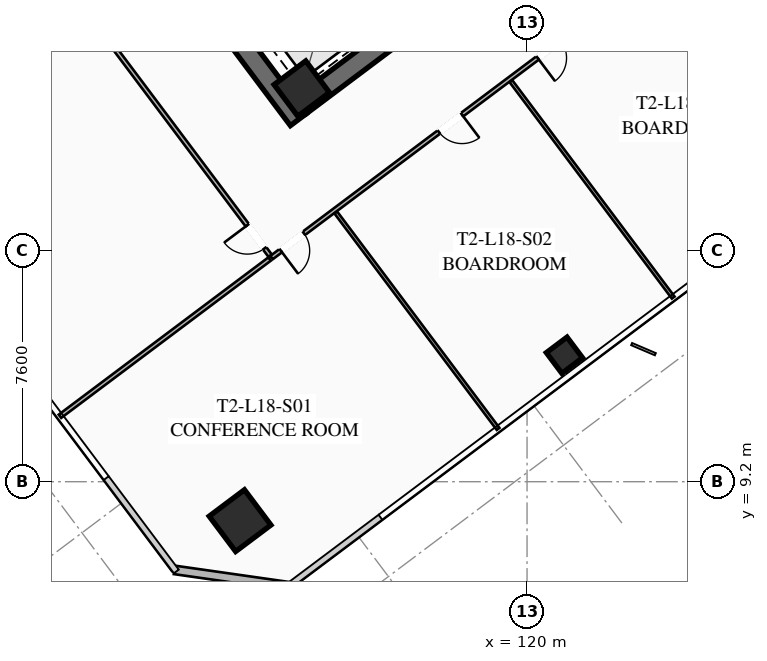
"""IFC4 building model, lengths in metres.
Left out: names, types, materials, properties, quantities, classifications, styles, units other than length and angle.
Written with IfcOpenShell. Run it as: python <this file> out.ifc"""

import sys

from ifc_helpers import new_model, si_unit, direction, frame, frame_2d, origin, origin_2d, place, context, subcontext, project, spatial, rectangle, hollow_rectangle, extrude, element, fill, save


model = new_model("IFC4")
c1 = context("Model", 3, precision=1e-05, world=origin(), true_north=direction((0.0, 1.0)))
c2 = subcontext(c1, "Body", "Model", "MODEL_VIEW")
j1 = project(units=[si_unit("LENGTHUNIT", "METRE"), si_unit("PLANEANGLEUNIT", "RADIAN")], contexts=[c1])
p1 = place(None, origin())
s1 = spatial("IfcSite", under=j1, at=p1, CompositionType="ELEMENT")
p2 = place(p1, origin())
s2 = spatial("IfcBuilding", under=s1, at=p2, CompositionType="ELEMENT")
p3 = place(p2, frame((0.0, 0.0, 70.75)))
s3 = spatial("IfcBuildingStorey", under=s2, at=p3, CompositionType="ELEMENT", Elevation=70.75)
p4 = place(p3, frame((112.476, 21.107, 0.0), z_axis=(0.0, 0.0, 1.0), x_axis=(-0.600005007985, 0.799996243986, 0.0)))
e1 = element("IfcWall", 1, at=p4, inside=s3, PredefinedType="SHEAR", context=c2, shape_type="SweptSolid", body=[
    extrude(rectangle(XDim=15.6, YDim=0.65, at=frame_2d((7.8, 0.0))), origin(), (0.0, 0.0, 1.0), 3.55),
])
p5 = place(p3, frame((124.429, 30.478, 0.0), z_axis=(0.0, 0.0, 1.0), x_axis=(-0.799998028465, -0.600002628705, 0.0)))
e2 = element("IfcWall", 2, at=p5, inside=s3, PredefinedType="SHEAR", context=c2, shape_type="SweptSolid", body=[
    extrude(rectangle(XDim=14.86, YDim=0.65, at=frame_2d((7.43, 0.0))), origin(), (0.0, 0.0, 1.0), 3.55),
])
p6 = place(p5, frame((9.13, 0.0, 0.0)))
e3 = element("IfcOpeningElement", 3, at=p6, cuts=e2, PredefinedType="OPENING", context=c2, shape_type="SweptSolid", body=[
    extrude(rectangle(XDim=1.25, YDim=2.25, at=frame_2d((0.625, 1.125))), frame((0.0, 0.335, 0.0), z_axis=(0.0, -1.0, 0.0), x_axis=(1.0, 0.0, 0.0)), (0.0, 0.0, 1.0), 0.67),
])
p7 = place(p5, frame((4.08, 0.0, 0.0)))
e4 = element("IfcOpeningElement", 4, at=p7, cuts=e2, PredefinedType="OPENING", context=c2, shape_type="SweptSolid", body=[
    extrude(rectangle(XDim=1.25, YDim=2.25, at=frame_2d((0.625, 1.125))), frame((0.0, 0.335, 0.0), z_axis=(0.0, -1.0, 0.0), x_axis=(1.0, 0.0, 0.0)), (0.0, 0.0, 1.0), 0.67),
])
p8 = place(p3, frame((112.59, 22.13, 0.0), z_axis=(0.0, 0.0, 1.0), x_axis=(0.799999996291, 0.600000004945, 0.0)))
e5 = element("IfcColumn", 5, at=p8, inside=s3, PredefinedType="COLUMN", context=c2, shape_type="SweptSolid", body=[
    extrude(hollow_rectangle(XDim=1.3, YDim=1.3, WallThickness=0.05, at=origin_2d()), origin(), (0.0, 0.0, 1.0), 3.35),
])
p9 = place(p3, frame((110.56, 7.92, 0.0), z_axis=(0.0, 0.0, 1.0), x_axis=(0.799999996291, 0.600000004945, 0.0)))
e6 = element("IfcColumn", 6, at=p9, inside=s3, PredefinedType="COLUMN", context=c2, shape_type="SweptSolid", body=[
    extrude(hollow_rectangle(XDim=1.45, YDim=1.45, WallThickness=0.055, at=origin_2d()), origin(), (0.0, 0.0, 1.0), 3.35),
])
p10 = place(p3, frame((121.23, 13.36, 0.0), z_axis=(0.0, 0.0, 1.0), x_axis=(0.799999996291, 0.600000004945, 0.0)))
e7 = element("IfcColumn", 7, at=p10, inside=s3, PredefinedType="COLUMN", context=c2, shape_type="SweptSolid", body=[
    extrude(hollow_rectangle(XDim=0.85, YDim=0.85, WallThickness=0.035, at=origin_2d()), origin(), (0.0, 0.0, 1.0), 3.35),
])
p11 = place(p3, frame((112.18, 5.76, 0.0), z_axis=(0.0, 0.0, 1.0), x_axis=(-0.989948214866, 0.141430307517, 0.0)))
e8 = element("IfcWall", 8, at=p11, inside=s3, PredefinedType="SOLIDWALL", context=c2, shape_type="SweptSolid", body=[
    extrude(rectangle(XDim=3.818, YDim=0.28, at=frame_2d((1.909, 0.0))), origin(), (0.0, 0.0, 1.0), 3.35),
])
p12 = place(p3, frame((134.18, 33.51, 0.0), z_axis=(0.0, 0.0, 1.0), x_axis=(-0.8, -0.6, 0.0)))
e9 = element("IfcWall", 9, at=p12, inside=s3, PredefinedType="PARTITIONING", context=c2, shape_type="SweptSolid", body=[
    extrude(rectangle(XDim=28.23, YDim=0.135, at=frame_2d((14.115, 0.0))), origin(), (0.0, 0.0, 1.0), 2.703),
])
p13 = place(p12, frame((26.9, 0.0, 0.0)))
e10 = element("IfcOpeningElement", 10, at=p13, cuts=e9, PredefinedType="OPENING", context=c2, shape_type="SweptSolid", body=[
    extrude(rectangle(XDim=0.95, YDim=2.05, at=frame_2d((0.475, 1.025))), frame((0.0, 0.077, 0.0), z_axis=(0.0, -1.0, 0.0), x_axis=(1.0, 0.0, 0.0)), (0.0, 0.0, 1.0), 0.155),
])
p14 = place(p12, frame((20.399, 0.0, 0.0)))
e11 = element("IfcOpeningElement", 11, at=p14, cuts=e9, PredefinedType="OPENING", context=c2, shape_type="SweptSolid", body=[
    extrude(rectangle(XDim=0.95, YDim=2.05, at=frame_2d((0.475, 1.025))), frame((0.0, 0.077, 0.0), z_axis=(0.0, -1.0, 0.0), x_axis=(1.0, 0.0, 0.0)), (0.0, 0.0, 1.0), 0.155),
])
p15 = place(p12, frame((16.339, 0.0, 0.0)))
e12 = element("IfcOpeningElement", 12, at=p15, cuts=e9, PredefinedType="OPENING", context=c2, shape_type="SweptSolid", body=[
    extrude(rectangle(XDim=0.95, YDim=2.05, at=frame_2d((0.475, 1.025))), frame((0.0, 0.077, 0.0), z_axis=(0.0, -1.0, 0.0), x_axis=(1.0, 0.0, 0.0)), (0.0, 0.0, 1.0), 0.155),
])
p16 = place(p12, frame((0.38, 0.0, 0.0)))
e13 = element("IfcOpeningElement", 13, at=p16, cuts=e9, PredefinedType="OPENING", context=c2, shape_type="SweptSolid", body=[
    extrude(rectangle(XDim=0.95, YDim=2.05, at=frame_2d((0.475, 1.025))), frame((0.0, 0.077, 0.0), z_axis=(0.0, -1.0, 0.0), x_axis=(1.0, 0.0, 0.0)), (0.0, 0.0, 1.0), 0.155),
])
for number, where, z_axis, x_axis in (
    (14, (119.048, 10.936, 0.0), (0.0, 0.0, 1.0), (-0.6, 0.8, 0.0)),
    (15, (124.808, 15.256, 0.0), (0.0, 0.0, 1.0), (-0.6, 0.8, 0.0)),
):
    element("IfcWall", number, at=place(p3, frame(where, z_axis=z_axis, x_axis=x_axis)), inside=s3, PredefinedType="PARTITIONING", context=c2, shape_type="SweptSolid", body=[
        extrude(rectangle(XDim=8.9, YDim=0.11, at=frame_2d((4.45, 0.0))), origin(), (0.0, 0.0, 1.0), 2.703),
    ])
p17 = place(p3, frame((111.548, 16.636, 0.0), z_axis=(0.0, 0.0, 1.0), x_axis=(-0.600003610192, 0.799997292343, 0.0)))
e16 = element("IfcWall", 16, at=p17, inside=s3, PredefinedType="PARTITIONING", context=c2, shape_type="SweptSolid", body=[
    extrude(rectangle(XDim=21.64, YDim=0.135, at=frame_2d((10.82, 0.0))), origin(), (0.0, 0.0, 1.0), 2.703),
])
p18 = place(p17, frame((0.3, 0.0, 0.0)))
e17 = element("IfcOpeningElement", 17, at=p18, cuts=e16, PredefinedType="OPENING", context=c2, shape_type="SweptSolid", body=[
    extrude(rectangle(XDim=0.95, YDim=2.05, at=frame_2d((0.475, 1.025))), frame((0.0, 0.077, 0.0), z_axis=(0.0, -1.0, 0.0), x_axis=(1.0, 0.0, 0.0)), (0.0, 0.0, 1.0), 0.155),
])
p19 = place(p3, frame((104.636, 11.352, 0.0), z_axis=(0.0, 0.0, 1.0), x_axis=(0.800006797429, 0.599990936654, 0.0)))
e18 = element("IfcWall", 18, at=p19, inside=s3, PredefinedType="PARTITIONING", context=c2, shape_type="SweptSolid", body=[
    extrude(rectangle(XDim=8.62, YDim=0.135, at=frame_2d((4.31, 0.0))), origin(), (0.0, 0.0, 1.0), 2.703),
])
p20 = place(p13, origin())
e19 = element("IfcDoor", 19, at=p20, inside=s3, OperationType="SINGLE_SWING_RIGHT", PredefinedType="DOOR", context=c2, shape_type="SweptSolid", body=[
    extrude(rectangle(XDim=0.95, YDim=2.05, at=frame_2d((0.475, 1.025))), frame((0.0, 0.025, 0.0), z_axis=(0.0, -1.0, 0.0), x_axis=(1.0, 0.0, 0.0)), (0.0, 0.0, 1.0), 0.05),
])
fill(e10, e19)
p21 = place(p14, origin())
e20 = element("IfcDoor", 20, at=p21, inside=s3, OperationType="SINGLE_SWING_LEFT", PredefinedType="DOOR", context=c2, shape_type="SweptSolid", body=[
    extrude(rectangle(XDim=0.95, YDim=2.05, at=frame_2d((0.475, 1.025))), frame((0.0, 0.025, 0.0), z_axis=(0.0, -1.0, 0.0), x_axis=(1.0, 0.0, 0.0)), (0.0, 0.0, 1.0), 0.05),
])
fill(e11, e20)
p22 = place(p15, origin())
e21 = element("IfcDoor", 21, at=p22, inside=s3, OperationType="SINGLE_SWING_RIGHT", PredefinedType="DOOR", context=c2, shape_type="SweptSolid", body=[
    extrude(rectangle(XDim=0.95, YDim=2.05, at=frame_2d((0.475, 1.025))), frame((0.0, 0.025, 0.0), z_axis=(0.0, -1.0, 0.0), x_axis=(1.0, 0.0, 0.0)), (0.0, 0.0, 1.0), 0.05),
])
fill(e12, e21)
p23 = place(p18, origin())
e22 = element("IfcDoor", 22, at=p23, inside=s3, OperationType="SINGLE_SWING_RIGHT", PredefinedType="DOOR", context=c2, shape_type="SweptSolid", body=[
    extrude(rectangle(XDim=0.95, YDim=2.05, at=frame_2d((0.475, 1.025))), frame((0.0, 0.025, 0.0), z_axis=(0.0, -1.0, 0.0), x_axis=(1.0, 0.0, 0.0)), (0.0, 0.0, 1.0), 0.05),
])
fill(e17, e22)
save(model, sys.argv[1])
